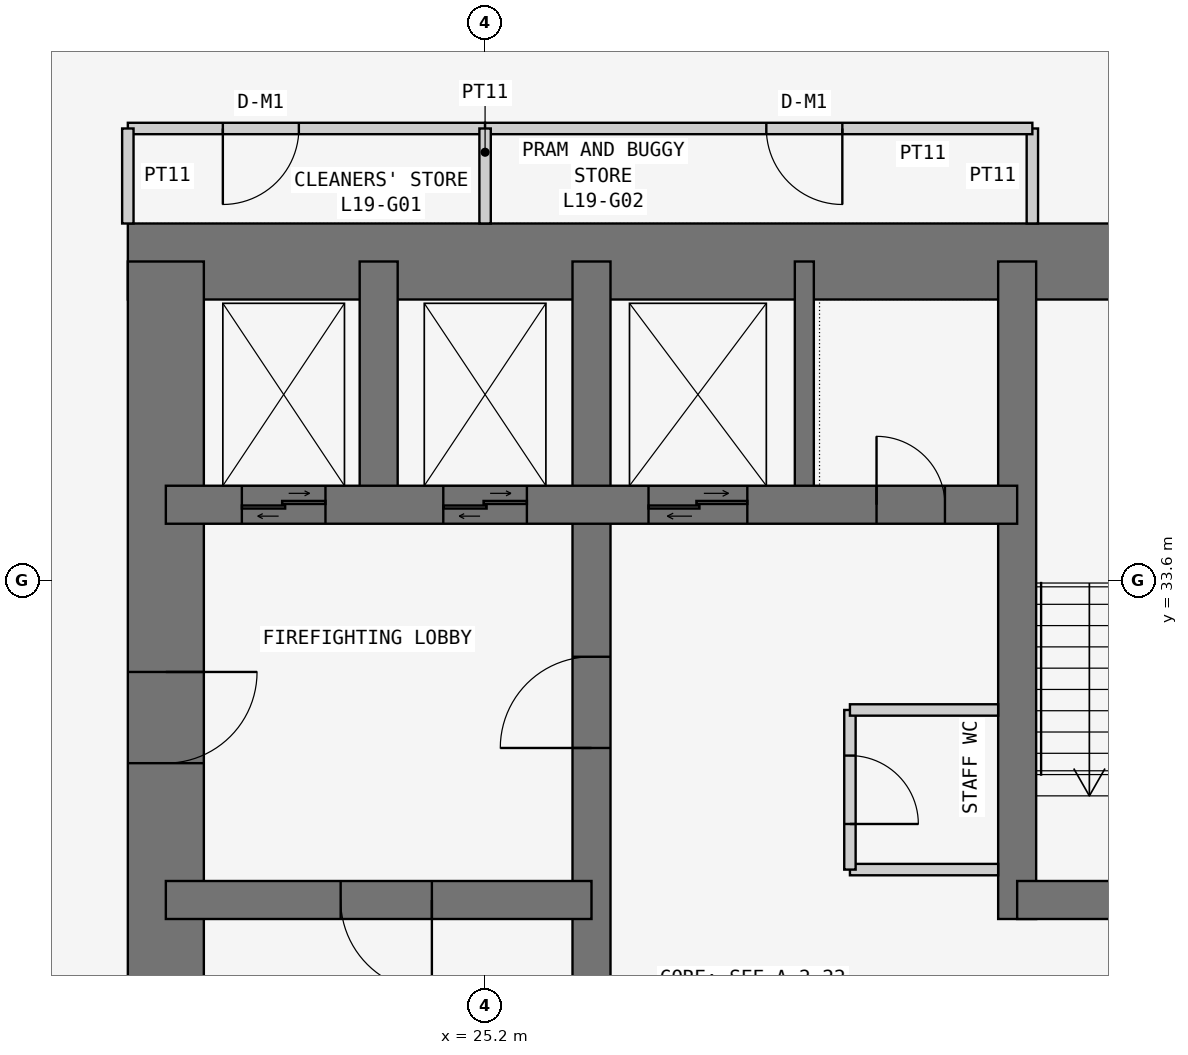
"""IFC4 building model, lengths in metres.
Left out: names, types, materials, properties, quantities, classifications, styles, units other than length and angle.
Written with IfcOpenShell. Run it as: python <this file> out.ifc"""

import sys

from ifc_helpers import new_model, si_unit, direction, frame, frame_2d, origin, place, context, subcontext, project, spatial, rectangle, extrude, element, fill, save


model = new_model("IFC4")
c1 = context("Model", 3, precision=1e-05, world=origin(), true_north=direction((0.0, 1.0)))
c2 = subcontext(c1, "Body", "Model", "MODEL_VIEW")
j1 = project(units=[si_unit("LENGTHUNIT", "METRE"), si_unit("PLANEANGLEUNIT", "RADIAN")], contexts=[c1])
p1 = place(None, origin())
s1 = spatial("IfcSite", under=j1, at=p1, CompositionType="ELEMENT")
p2 = place(p1, origin())
s2 = spatial("IfcBuilding", under=s1, at=p2, CompositionType="ELEMENT")
p3 = place(p2, frame((0.0, 0.0, 77.7)))
s3 = spatial("IfcBuildingStorey", under=s2, at=p3, CompositionType="ELEMENT", Elevation=77.7)
p4 = place(p3, frame((37.8, 37.8, 0.0), z_axis=(0.0, 0.0, 1.0), x_axis=(-1.0, 0.0, 0.0)))
e1 = element("IfcWall", 1, at=p4, inside=s3, PredefinedType="SHEAR", context=c2, shape_type="SweptSolid", body=[
    extrude(rectangle(XDim=17.3, YDim=1.0, at=frame_2d((8.65, 0.0))), origin(), (0.0, 0.0, 1.0), 3.6),
])
p5 = place(p3, frame((21.0, 37.8, 0.0), z_axis=(0.0, 0.0, 1.0), x_axis=(0.0, -1.0, 0.0)))
e2 = element("IfcWall", 2, at=p5, inside=s3, PredefinedType="SHEAR", context=c2, shape_type="SweptSolid", body=[
    extrude(rectangle(XDim=17.3, YDim=1.0, at=frame_2d((8.65, 0.0))), origin(), (0.0, 0.0, 1.0), 3.6),
])
p6 = place(p5, frame((5.4, 0.0, 0.0)))
e3 = element("IfcOpeningElement", 3, at=p6, cuts=e2, PredefinedType="OPENING", context=c2, shape_type="SweptSolid", body=[
    extrude(rectangle(XDim=1.2, YDim=2.1, at=frame_2d((0.6, 1.05))), frame((0.0, 0.51, 0.0), z_axis=(0.0, -1.0, 0.0), x_axis=(1.0, 0.0, 0.0)), (0.0, 0.0, 1.0), 1.02),
])
p7 = place(p3, frame((26.6, 21.0, 0.0), z_axis=(0.0, 0.0, 1.0), x_axis=(0.0, 1.0, 0.0)))
e4 = element("IfcWall", 4, at=p7, inside=s3, PredefinedType="SHEAR", context=c2, shape_type="SweptSolid", body=[
    extrude(rectangle(XDim=16.8, YDim=0.5, at=frame_2d((8.4, 0.0))), origin(), (0.0, 0.0, 1.0), 3.6),
])
p8 = place(p7, frame((10.4, 0.0, 0.0)))
e5 = element("IfcOpeningElement", 5, at=p8, cuts=e4, PredefinedType="OPENING", context=c2, shape_type="SweptSolid", body=[
    extrude(rectangle(XDim=1.2, YDim=2.1, at=frame_2d((0.6, 1.05))), frame((0.0, 0.26, 0.0), z_axis=(0.0, -1.0, 0.0), x_axis=(1.0, 0.0, 0.0)), (0.0, 0.0, 1.0), 0.52),
])
p9 = place(p3, frame((21.0, 29.4, 0.0), z_axis=(0.0, 0.0, 1.0), x_axis=(1.0, 0.0, 0.0)))
e6 = element("IfcWall", 6, at=p9, inside=s3, PredefinedType="SHEAR", context=c2, shape_type="SweptSolid", body=[
    extrude(rectangle(XDim=5.6, YDim=0.5, at=frame_2d((2.8, 0.0))), origin(), (0.0, 0.0, 1.0), 3.6),
])
p10 = place(p9, frame((2.3, 0.0, 0.0)))
e7 = element("IfcOpeningElement", 7, at=p10, cuts=e6, PredefinedType="OPENING", context=c2, shape_type="SweptSolid", body=[
    extrude(rectangle(XDim=1.2, YDim=2.1, at=frame_2d((0.6, 1.05))), frame((0.0, 0.26, 0.0), z_axis=(0.0, -1.0, 0.0), x_axis=(1.0, 0.0, 0.0)), (0.0, 0.0, 1.0), 0.52),
])
p11 = place(p3, frame((21.0, 34.6, 0.0), z_axis=(0.0, 0.0, 1.0), x_axis=(1.0, 0.0, 0.0)))
e8 = element("IfcWall", 8, at=p11, inside=s3, PredefinedType="SHEAR", context=c2, shape_type="SweptSolid", body=[
    extrude(rectangle(XDim=11.2, YDim=0.5, at=frame_2d((5.6, 0.0))), origin(), (0.0, 0.0, 1.0), 3.6),
])
p12 = place(p11, frame((9.35, 0.0, 0.0)))
e9 = element("IfcOpeningElement", 9, at=p12, cuts=e8, PredefinedType="OPENING", context=c2, shape_type="SweptSolid", body=[
    extrude(rectangle(XDim=0.9, YDim=2.1, at=frame_2d((0.45, 1.05))), frame((0.0, 0.26, 0.0), z_axis=(0.0, -1.0, 0.0), x_axis=(1.0, 0.0, 0.0)), (0.0, 0.0, 1.0), 0.52),
])
p13 = place(p11, frame((1.0, 0.0, 0.0)))
e10 = element("IfcOpeningElement", 10, at=p13, cuts=e8, PredefinedType="OPENING", context=c2, shape_type="SweptSolid", body=[
    extrude(rectangle(XDim=1.1, YDim=2.1, at=frame_2d((0.55, 1.05))), frame((0.0, 0.26, 0.0), z_axis=(0.0, -1.0, 0.0), x_axis=(1.0, 0.0, 0.0)), (0.0, 0.0, 1.0), 0.52),
])
p14 = place(p11, frame((3.65, 0.0, 0.0)))
e11 = element("IfcOpeningElement", 11, at=p14, cuts=e8, PredefinedType="OPENING", context=c2, shape_type="SweptSolid", body=[
    extrude(rectangle(XDim=1.1, YDim=2.1, at=frame_2d((0.55, 1.05))), frame((0.0, 0.26, 0.0), z_axis=(0.0, -1.0, 0.0), x_axis=(1.0, 0.0, 0.0)), (0.0, 0.0, 1.0), 0.52),
])
p15 = place(p11, frame((6.35, 0.0, 0.0)))
e12 = element("IfcOpeningElement", 12, at=p15, cuts=e8, PredefinedType="OPENING", context=c2, shape_type="SweptSolid", body=[
    extrude(rectangle(XDim=1.3, YDim=2.1, at=frame_2d((0.65, 1.05))), frame((0.0, 0.26, 0.0), z_axis=(0.0, -1.0, 0.0), x_axis=(1.0, 0.0, 0.0)), (0.0, 0.0, 1.0), 0.52),
])
p16 = place(p3, frame((23.8, 34.6, 0.0), z_axis=(0.0, 0.0, 1.0), x_axis=(0.0, 1.0, 0.0)))
e13 = element("IfcWall", 13, at=p16, inside=s3, PredefinedType="SHEAR", context=c2, shape_type="SweptSolid", body=[
    extrude(rectangle(XDim=3.2, YDim=0.5, at=frame_2d((1.6, 0.0))), origin(), (0.0, 0.0, 1.0), 3.6),
])
p17 = place(p3, frame((32.2, 29.15, 0.0), z_axis=(0.0, 0.0, 1.0), x_axis=(0.0, 1.0, 0.0)))
e14 = element("IfcWall", 14, at=p17, inside=s3, PredefinedType="SHEAR", context=c2, shape_type="SweptSolid", body=[
    extrude(rectangle(XDim=8.65, YDim=0.5, at=frame_2d((4.325, 0.0))), origin(), (0.0, 0.0, 1.0), 3.6),
])
p18 = place(p3, frame((32.2, 29.4, 0.0), z_axis=(0.0, 0.0, 1.0), x_axis=(1.0, 0.0, 0.0)))
e15 = element("IfcWall", 15, at=p18, inside=s3, PredefinedType="SHEAR", context=c2, shape_type="SweptSolid", body=[
    extrude(rectangle(XDim=5.6, YDim=0.5, at=frame_2d((2.8, 0.0))), origin(), (0.0, 0.0, 1.0), 3.6),
])
p19 = place(p18, frame((2.0, 0.0, 0.0)))
e16 = element("IfcOpeningElement", 16, at=p19, cuts=e15, PredefinedType="OPENING", context=c2, shape_type="SweptSolid", body=[
    extrude(rectangle(XDim=1.2, YDim=2.1, at=frame_2d((0.6, 1.05))), frame((0.0, 0.26, 0.0), z_axis=(0.0, -1.0, 0.0), x_axis=(1.0, 0.0, 0.0)), (0.0, 0.0, 1.0), 0.52),
])
p20 = place(p3, frame((29.4, 34.6, 0.0), z_axis=(0.0, 0.0, 1.0), x_axis=(0.0, 1.0, 0.0)))
e17 = element("IfcWall", 17, at=p20, inside=s3, PredefinedType="SHEAR", context=c2, shape_type="SweptSolid", body=[
    extrude(rectangle(XDim=3.2, YDim=0.25, at=frame_2d((1.6, 0.0))), origin(), (0.0, 0.0, 1.0), 3.6),
])
p21 = place(p3, frame((25.2, 39.55, 0.0), z_axis=(0.0, 0.0, 1.0), x_axis=(-1.0, 0.0, 0.0)))
e18 = element("IfcWall", 18, at=p21, inside=s3, PredefinedType="PARTITIONING", context=c2, shape_type="SweptSolid", body=[
    extrude(rectangle(XDim=4.7, YDim=0.15, at=frame_2d((2.35, 0.0))), origin(), (0.0, 0.0, 1.0), 3.45),
])
p22 = place(p21, frame((2.45, 0.0, 0.0)))
e19 = element("IfcOpeningElement", 19, at=p22, cuts=e18, PredefinedType="OPENING", context=c2, shape_type="SweptSolid", body=[
    extrude(rectangle(XDim=1.0, YDim=2.1, at=frame_2d((0.5, 1.05))), frame((0.0, 0.085, 0.0), z_axis=(0.0, -1.0, 0.0), x_axis=(1.0, 0.0, 0.0)), (0.0, 0.0, 1.0), 0.17),
])
for number, where, z_axis, x_axis in (
    (20, (20.5, 39.55, 0.0), (0.0, 0.0, 1.0), (0.0, -1.0, 0.0)),
    (21, (32.4, 38.3, 0.0), (0.0, 0.0, 1.0), (0.0, 1.0, 0.0)),
):
    element("IfcWall", number, at=place(p3, frame(where, z_axis=z_axis, x_axis=x_axis)), inside=s3, PredefinedType="PARTITIONING", context=c2, shape_type="SweptSolid", body=[
        extrude(rectangle(XDim=1.25, YDim=0.15, at=frame_2d((0.625, 0.0))), origin(), (0.0, 0.0, 1.0), 3.45),
    ])
p23 = place(p3, frame((32.4, 39.55, 0.0), z_axis=(0.0, 0.0, 1.0), x_axis=(-1.0, 0.0, 0.0)))
e22 = element("IfcWall", 22, at=p23, inside=s3, PredefinedType="PARTITIONING", context=c2, shape_type="SweptSolid", body=[
    extrude(rectangle(XDim=7.2, YDim=0.15, at=frame_2d((3.6, 0.0))), origin(), (0.0, 0.0, 1.0), 3.45),
])
p24 = place(p23, frame((2.5, 0.0, 0.0)))
e23 = element("IfcOpeningElement", 23, at=p24, cuts=e22, PredefinedType="OPENING", context=c2, shape_type="SweptSolid", body=[
    extrude(rectangle(XDim=1.0, YDim=2.1, at=frame_2d((0.5, 1.05))), frame((0.0, 0.085, 0.0), z_axis=(0.0, -1.0, 0.0), x_axis=(1.0, 0.0, 0.0)), (0.0, 0.0, 1.0), 0.17),
])
p25 = place(p3, frame((25.2, 38.3, 0.0), z_axis=(0.0, 0.0, 1.0), x_axis=(0.0, 1.0, 0.0)))
e24 = element("IfcWall", 24, at=p25, inside=s3, PredefinedType="PARTITIONING", context=c2, shape_type="SweptSolid", body=[
    extrude(rectangle(XDim=1.25, YDim=0.15, at=frame_2d((0.625, 0.0))), origin(), (0.0, 0.0, 1.0), 2.767),
])
p26 = place(p3, frame((31.95, 29.8, 0.0), z_axis=(0.0, 0.0, 1.0), x_axis=(-1.0, 0.0, 0.0)))
e25 = element("IfcWall", 25, at=p26, inside=s3, PredefinedType="PARTITIONING", context=c2, shape_type="SweptSolid", body=[
    extrude(rectangle(XDim=1.95, YDim=0.15, at=frame_2d((0.975, 0.0))), origin(), (0.0, 0.0, 1.0), 3.45),
])
p27 = place(p3, frame((30.0, 29.8, 0.0), z_axis=(0.0, 0.0, 1.0), x_axis=(0.0, 1.0, 0.0)))
e26 = element("IfcWall", 26, at=p27, inside=s3, PredefinedType="PARTITIONING", context=c2, shape_type="SweptSolid", body=[
    extrude(rectangle(XDim=2.1, YDim=0.15, at=frame_2d((1.05, 0.0))), origin(), (0.0, 0.0, 1.0), 3.45),
])
p28 = place(p27, frame((0.6, 0.0, 0.0)))
e27 = element("IfcOpeningElement", 27, at=p28, cuts=e26, PredefinedType="OPENING", context=c2, shape_type="SweptSolid", body=[
    extrude(rectangle(XDim=0.9, YDim=2.1, at=frame_2d((0.45, 1.05))), frame((0.0, 0.085, 0.0), z_axis=(0.0, -1.0, 0.0), x_axis=(1.0, 0.0, 0.0)), (0.0, 0.0, 1.0), 0.17),
])
p29 = place(p3, frame((30.0, 31.9, 0.0), z_axis=(0.0, 0.0, 1.0), x_axis=(1.0, 0.0, 0.0)))
e28 = element("IfcWall", 28, at=p29, inside=s3, PredefinedType="PARTITIONING", context=c2, shape_type="SweptSolid", body=[
    extrude(rectangle(XDim=1.95, YDim=0.15, at=frame_2d((0.975, 0.0))), origin(), (0.0, 0.0, 1.0), 3.45),
])
p30 = place(p22, origin())
e29 = element("IfcDoor", 29, at=p30, inside=s3, OperationType="SINGLE_SWING_RIGHT", PredefinedType="DOOR", context=c2, shape_type="SweptSolid", body=[
    extrude(rectangle(XDim=1.0, YDim=2.1, at=frame_2d((0.5, 1.05))), frame((0.0, 0.025, 0.0), z_axis=(0.0, -1.0, 0.0), x_axis=(1.0, 0.0, 0.0)), (0.0, 0.0, 1.0), 0.05),
])
fill(e19, e29)
p31 = place(p24, origin())
e30 = element("IfcDoor", 30, at=p31, inside=s3, OperationType="SINGLE_SWING_LEFT", PredefinedType="DOOR", context=c2, shape_type="SweptSolid", body=[
    extrude(rectangle(XDim=1.0, YDim=2.1, at=frame_2d((0.5, 1.05))), frame((0.0, 0.025, 0.0), z_axis=(0.0, -1.0, 0.0), x_axis=(1.0, 0.0, 0.0)), (0.0, 0.0, 1.0), 0.05),
])
fill(e23, e30)
p32 = place(p6, origin())
e31 = element("IfcDoor", 31, at=p32, inside=s3, OperationType="SINGLE_SWING_LEFT", PredefinedType="DOOR", context=c2, shape_type="SweptSolid", body=[
    extrude(rectangle(XDim=1.2, YDim=2.1, at=frame_2d((0.6, 1.05))), frame((0.0, 0.025, 0.0), z_axis=(0.0, -1.0, 0.0), x_axis=(1.0, 0.0, 0.0)), (0.0, 0.0, 1.0), 0.05),
])
fill(e3, e31)
p33 = place(p10, frame((1.2, 0.0, 0.0), z_axis=(0.0, 0.0, 1.0), x_axis=(-1.0, 0.0, 0.0)))
e32 = element("IfcDoor", 32, at=p33, inside=s3, OperationType="SINGLE_SWING_LEFT", PredefinedType="DOOR", context=c2, shape_type="SweptSolid", body=[
    extrude(rectangle(XDim=1.2, YDim=2.1, at=frame_2d((0.6, 1.05))), frame((0.0, 0.025, 0.0), z_axis=(0.0, -1.0, 0.0), x_axis=(1.0, 0.0, 0.0)), (0.0, 0.0, 1.0), 0.05),
])
fill(e7, e32)
p34 = place(p8, origin())
e33 = element("IfcDoor", 33, at=p34, inside=s3, OperationType="SINGLE_SWING_LEFT", PredefinedType="DOOR", context=c2, shape_type="SweptSolid", body=[
    extrude(rectangle(XDim=1.2, YDim=2.1, at=frame_2d((0.6, 1.05))), frame((0.0, 0.025, 0.0), z_axis=(0.0, -1.0, 0.0), x_axis=(1.0, 0.0, 0.0)), (0.0, 0.0, 1.0), 0.05),
])
fill(e5, e33)
p35 = place(p12, origin())
e34 = element("IfcDoor", 34, at=p35, inside=s3, OperationType="SINGLE_SWING_LEFT", PredefinedType="DOOR", context=c2, shape_type="SweptSolid", body=[
    extrude(rectangle(XDim=0.9, YDim=2.1, at=frame_2d((0.45, 1.05))), frame((0.0, 0.025, 0.0), z_axis=(0.0, -1.0, 0.0), x_axis=(1.0, 0.0, 0.0)), (0.0, 0.0, 1.0), 0.05),
])
fill(e9, e34)
p36 = place(p28, frame((0.9, 0.0, 0.0), z_axis=(0.0, 0.0, 1.0), x_axis=(-1.0, 0.0, 0.0)))
e35 = element("IfcDoor", 35, at=p36, inside=s3, OperationType="SINGLE_SWING_RIGHT", PredefinedType="DOOR", context=c2, shape_type="SweptSolid", body=[
    extrude(rectangle(XDim=0.9, YDim=2.1, at=frame_2d((0.45, 1.05))), frame((0.0, 0.025, 0.0), z_axis=(0.0, -1.0, 0.0), x_axis=(1.0, 0.0, 0.0)), (0.0, 0.0, 1.0), 0.05),
])
fill(e27, e35)
p37 = place(p13, origin())
e36 = element("IfcDoor", 36, at=p37, inside=s3, OperationType="DOUBLE_DOOR_SLIDING", PredefinedType="DOOR", context=c2, shape_type="SweptSolid", body=[
    extrude(rectangle(XDim=1.1, YDim=2.1, at=frame_2d((0.55, 1.05))), frame((0.0, 0.025, 0.0), z_axis=(0.0, -1.0, 0.0), x_axis=(1.0, 0.0, 0.0)), (0.0, 0.0, 1.0), 0.05),
])
fill(e10, e36)
p38 = place(p14, origin())
e37 = element("IfcDoor", 37, at=p38, inside=s3, OperationType="DOUBLE_DOOR_SLIDING", PredefinedType="DOOR", context=c2, shape_type="SweptSolid", body=[
    extrude(rectangle(XDim=1.1, YDim=2.1, at=frame_2d((0.55, 1.05))), frame((0.0, 0.025, 0.0), z_axis=(0.0, -1.0, 0.0), x_axis=(1.0, 0.0, 0.0)), (0.0, 0.0, 1.0), 0.05),
])
fill(e11, e37)
p39 = place(p15, origin())
e38 = element("IfcDoor", 38, at=p39, inside=s3, OperationType="DOUBLE_DOOR_SLIDING", PredefinedType="DOOR", context=c2, shape_type="SweptSolid", body=[
    extrude(rectangle(XDim=1.3, YDim=2.1, at=frame_2d((0.65, 1.05))), frame((0.0, 0.025, 0.0), z_axis=(0.0, -1.0, 0.0), x_axis=(1.0, 0.0, 0.0)), (0.0, 0.0, 1.0), 0.05),
])
fill(e12, e38)
save(model, sys.argv[1])
